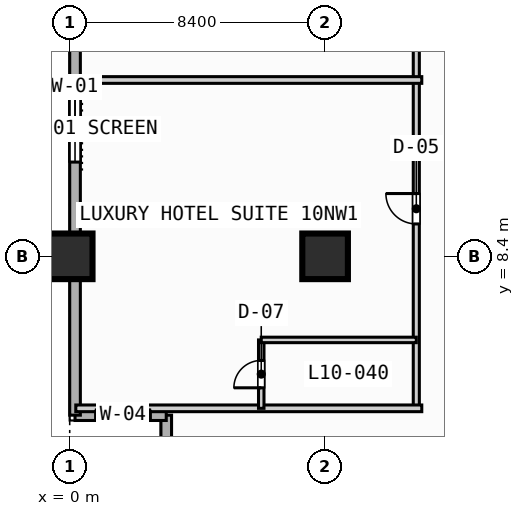
"""IFC4 building model, lengths in metres.
Left out: names, types, materials, properties, quantities, classifications, styles, units other than length and angle.
Written with IfcOpenShell. Run it as: python <this file> out.ifc"""

import sys

from ifc_helpers import new_model, si_unit, direction, frame, frame_2d, origin, origin_2d, place, context, subcontext, project, spatial, rectangle, extrude, element, fill, save


model = new_model("IFC4")
c1 = context("Model", 3, precision=1e-05, world=origin(), true_north=direction((0.0, 1.0)))
c2 = subcontext(c1, "Body", "Model", "MODEL_VIEW")
j1 = project(units=[si_unit("LENGTHUNIT", "METRE"), si_unit("PLANEANGLEUNIT", "RADIAN")], contexts=[c1])
p1 = place(None, origin())
s1 = spatial("IfcSite", under=j1, at=p1, CompositionType="ELEMENT")
p2 = place(p1, origin())
s2 = spatial("IfcBuilding", under=s1, at=p2, CompositionType="ELEMENT")
p3 = place(p2, frame((0.0, 0.0, 47.2)))
s3 = spatial("IfcBuildingStorey", under=s2, at=p3, CompositionType="ELEMENT", Elevation=47.2)
for number, where, z_axis, x_axis in (
    (1, (0.0, 8.4, 0.0), (0.0, 0.0, 1.0), (1.0, 0.0, 0.0)),
    (2, (8.4, 8.4, 0.0), (0.0, 0.0, 1.0), (1.0, 0.0, 0.0)),
):
    element("IfcColumn", number, at=place(p3, frame(where, z_axis=z_axis, x_axis=x_axis)), inside=s3, PredefinedType="COLUMN", context=c2, shape_type="SweptSolid", body=[
        extrude(rectangle(XDim=1.5, YDim=1.5, at=origin_2d()), origin(), (0.0, 0.0, 1.0), 3.8),
    ])
p4 = place(p3, frame((3.175, 0.175, 0.0), z_axis=(0.0, 0.0, 1.0), x_axis=(0.0, 1.0, 0.0)))
e3 = element("IfcWall", 3, at=p4, inside=s3, PredefinedType="STANDARD", context=c2, shape_type="SweptSolid", body=[
    extrude(rectangle(XDim=3.0, YDim=0.35, at=frame_2d((1.5, 0.0))), origin(), (0.0, 0.0, 1.0), 3.55),
])
p5 = place(p3, frame((3.175, 3.175, 0.0), z_axis=(0.0, 0.0, 1.0), x_axis=(-1.0, 0.0, 0.0)))
e4 = element("IfcWall", 4, at=p5, inside=s3, PredefinedType="STANDARD", context=c2, shape_type="SweptSolid", body=[
    extrude(rectangle(XDim=3.0, YDim=0.35, at=frame_2d((1.5, 0.0))), origin(), (0.0, 0.0, 1.0), 3.55),
])
p6 = place(p5, frame((0.522, 0.0, 0.85)))
e5 = element("IfcOpeningElement", 5, at=p6, cuts=e4, PredefinedType="OPENING", context=c2, shape_type="SweptSolid", body=[
    extrude(rectangle(XDim=1.8, YDim=1.8, at=frame_2d((0.9, 0.9))), frame((0.0, 0.185, 0.0), z_axis=(0.0, -1.0, 0.0), x_axis=(1.0, 0.0, 0.0)), (0.0, 0.0, 1.0), 0.37),
])
p7 = place(p3, frame((0.175, 3.175, 0.0), z_axis=(0.0, 0.0, 1.0), x_axis=(0.0, 1.0, 0.0)))
e6 = element("IfcWall", 6, at=p7, inside=s3, PredefinedType="STANDARD", context=c2, shape_type="SweptSolid", body=[
    extrude(rectangle(XDim=86.05, YDim=0.35, at=frame_2d((43.025, 0.0))), origin(), (0.0, 0.0, 1.0), 3.55),
])
p8 = place(p7, frame((42.325, 0.0, 0.0)))
e7 = element("IfcOpeningElement", 7, at=p8, cuts=e6, PredefinedType="OPENING", context=c2, shape_type="SweptSolid", body=[
    extrude(rectangle(XDim=1.4, YDim=2.2, at=frame_2d((0.7, 1.1))), frame((0.0, 0.185, 0.0), z_axis=(0.0, -1.0, 0.0), x_axis=(1.0, 0.0, 0.0)), (0.0, 0.0, 1.0), 0.37),
])
p9 = place(p7, frame((8.325, 0.0, 0.85)))
e8 = element("IfcOpeningElement", 8, at=p9, cuts=e6, PredefinedType="OPENING", context=c2, shape_type="SweptSolid", body=[
    extrude(rectangle(XDim=2.2, YDim=1.8, at=frame_2d((1.1, 0.9))), frame((0.0, 0.185, 0.0), z_axis=(0.0, -1.0, 0.0), x_axis=(1.0, 0.0, 0.0)), (0.0, 0.0, 1.0), 0.37),
])
p10 = place(p7, frame((16.725, 0.0, 0.85)))
e9 = element("IfcOpeningElement", 9, at=p10, cuts=e6, PredefinedType="OPENING", context=c2, shape_type="SweptSolid", body=[
    extrude(rectangle(XDim=2.2, YDim=1.8, at=frame_2d((1.1, 0.9))), frame((0.0, 0.185, 0.0), z_axis=(0.0, -1.0, 0.0), x_axis=(1.0, 0.0, 0.0)), (0.0, 0.0, 1.0), 0.37),
])
p11 = place(p7, frame((25.125, 0.0, 0.85)))
e10 = element("IfcOpeningElement", 10, at=p11, cuts=e6, PredefinedType="OPENING", context=c2, shape_type="SweptSolid", body=[
    extrude(rectangle(XDim=2.2, YDim=1.8, at=frame_2d((1.1, 0.9))), frame((0.0, 0.185, 0.0), z_axis=(0.0, -1.0, 0.0), x_axis=(1.0, 0.0, 0.0)), (0.0, 0.0, 1.0), 0.37),
])
p12 = place(p7, frame((33.525, 0.0, 0.85)))
e11 = element("IfcOpeningElement", 11, at=p12, cuts=e6, PredefinedType="OPENING", context=c2, shape_type="SweptSolid", body=[
    extrude(rectangle(XDim=2.2, YDim=1.8, at=frame_2d((1.1, 0.9))), frame((0.0, 0.185, 0.0), z_axis=(0.0, -1.0, 0.0), x_axis=(1.0, 0.0, 0.0)), (0.0, 0.0, 1.0), 0.37),
])
p13 = place(p7, frame((56.675, 0.0, 0.85)))
e12 = element("IfcOpeningElement", 12, at=p13, cuts=e6, PredefinedType="OPENING", context=c2, shape_type="SweptSolid", body=[
    extrude(rectangle(XDim=1.8, YDim=1.8, at=frame_2d((0.9, 0.9))), frame((0.0, 0.185, 0.0), z_axis=(0.0, -1.0, 0.0), x_axis=(1.0, 0.0, 0.0)), (0.0, 0.0, 1.0), 0.37),
])
p14 = place(p3, frame((11.4, 3.4, 0.0), z_axis=(0.0, 0.0, 1.0), x_axis=(0.0, 1.0, 0.0)))
e13 = element("IfcWall", 13, at=p14, inside=s3, PredefinedType="PARTITIONING", context=c2, shape_type="SweptSolid", body=[
    extrude(rectangle(XDim=60.4, YDim=0.2, at=frame_2d((30.2, 0.0))), origin(), (0.0, 0.0, 1.0), 3.55),
])
p15 = place(p14, frame((6.065, 0.0, 0.0)))
e14 = element("IfcOpeningElement", 14, at=p15, cuts=e13, PredefinedType="OPENING", context=c2, shape_type="SweptSolid", body=[
    extrude(rectangle(XDim=1.0, YDim=2.15, at=frame_2d((0.5, 1.075))), frame((0.0, 0.11, 0.0), z_axis=(0.0, -1.0, 0.0), x_axis=(1.0, 0.0, 0.0)), (0.0, 0.0, 1.0), 0.22),
])
p16 = place(p14, frame((13.735, 0.0, 0.0)))
e15 = element("IfcOpeningElement", 15, at=p16, cuts=e13, PredefinedType="OPENING", context=c2, shape_type="SweptSolid", body=[
    extrude(rectangle(XDim=1.0, YDim=2.15, at=frame_2d((0.5, 1.075))), frame((0.0, 0.11, 0.0), z_axis=(0.0, -1.0, 0.0), x_axis=(1.0, 0.0, 0.0)), (0.0, 0.0, 1.0), 0.22),
])
p17 = place(p14, frame((22.96, 0.0, 0.0)))
e16 = element("IfcOpeningElement", 16, at=p17, cuts=e13, PredefinedType="OPENING", context=c2, shape_type="SweptSolid", body=[
    extrude(rectangle(XDim=1.0, YDim=2.15, at=frame_2d((0.5, 1.075))), frame((0.0, 0.11, 0.0), z_axis=(0.0, -1.0, 0.0), x_axis=(1.0, 0.0, 0.0)), (0.0, 0.0, 1.0), 0.22),
])
p18 = place(p14, frame((31.785, 0.0, 0.0)))
e17 = element("IfcOpeningElement", 17, at=p18, cuts=e13, PredefinedType="OPENING", context=c2, shape_type="SweptSolid", body=[
    extrude(rectangle(XDim=1.0, YDim=2.15, at=frame_2d((0.5, 1.075))), frame((0.0, 0.11, 0.0), z_axis=(0.0, -1.0, 0.0), x_axis=(1.0, 0.0, 0.0)), (0.0, 0.0, 1.0), 0.22),
])
p19 = place(p14, frame((42.56, 0.0, 0.0)))
e18 = element("IfcOpeningElement", 18, at=p19, cuts=e13, PredefinedType="OPENING", context=c2, shape_type="SweptSolid", body=[
    extrude(rectangle(XDim=1.0, YDim=2.15, at=frame_2d((0.5, 1.075))), frame((0.0, 0.11, 0.0), z_axis=(0.0, -1.0, 0.0), x_axis=(1.0, 0.0, 0.0)), (0.0, 0.0, 1.0), 0.22),
])
p20 = place(p14, frame((53.935, 0.0, 0.0)))
e19 = element("IfcOpeningElement", 19, at=p20, cuts=e13, PredefinedType="OPENING", context=c2, shape_type="SweptSolid", body=[
    extrude(rectangle(XDim=1.0, YDim=2.15, at=frame_2d((0.5, 1.075))), frame((0.0, 0.11, 0.0), z_axis=(0.0, -1.0, 0.0), x_axis=(1.0, 0.0, 0.0)), (0.0, 0.0, 1.0), 0.22),
])
p21 = place(p3, frame((0.2, 3.4, 0.0), z_axis=(0.0, 0.0, 1.0), x_axis=(1.0, 0.0, 0.0)))
e20 = element("IfcWall", 20, at=p21, inside=s3, PredefinedType="PARTITIONING", context=c2, shape_type="SweptSolid", body=[
    extrude(rectangle(XDim=11.38, YDim=0.22, at=frame_2d((5.69, 0.0))), origin(), (0.0, 0.0, 1.0), 3.55),
])
p22 = place(p3, frame((6.3, 3.4, 0.0), z_axis=(0.0, 0.0, 1.0), x_axis=(0.0, 1.0, 0.0)))
e21 = element("IfcWall", 21, at=p22, inside=s3, PredefinedType="PLUMBINGWALL", context=c2, shape_type="SweptSolid", body=[
    extrude(rectangle(XDim=2.25, YDim=0.18, at=frame_2d((1.125, 0.0))), origin(), (0.0, 0.0, 1.0), 3.55),
])
p23 = place(p22, frame((0.675, 0.0, 0.0)))
e22 = element("IfcOpeningElement", 22, at=p23, cuts=e21, PredefinedType="OPENING", context=c2, shape_type="SweptSolid", body=[
    extrude(rectangle(XDim=0.9, YDim=2.1, at=frame_2d((0.45, 1.05))), frame((0.0, 0.1, 0.0), z_axis=(0.0, -1.0, 0.0), x_axis=(1.0, 0.0, 0.0)), (0.0, 0.0, 1.0), 0.2),
])
p24 = place(p3, frame((6.3, 5.65, 0.0), z_axis=(0.0, 0.0, 1.0), x_axis=(1.0, 0.0, 0.0)))
e23 = element("IfcWall", 23, at=p24, inside=s3, PredefinedType="PLUMBINGWALL", context=c2, shape_type="SweptSolid", body=[
    extrude(rectangle(XDim=5.1, YDim=0.18, at=frame_2d((2.55, 0.0))), origin(), (0.0, 0.0, 1.0), 3.55),
])
p25 = place(p3, frame((0.2, 14.2, 0.0), z_axis=(0.0, 0.0, 1.0), x_axis=(1.0, 0.0, 0.0)))
e24 = element("IfcWall", 24, at=p25, inside=s3, PredefinedType="PARTITIONING", context=c2, shape_type="SweptSolid", body=[
    extrude(rectangle(XDim=11.38, YDim=0.22, at=frame_2d((5.69, 0.0))), origin(), (0.0, 0.0, 1.0), 3.55),
])
p26 = place(p6, origin())
e25 = element("IfcWindow", 25, at=p26, inside=s3, PartitioningType="SINGLE_PANEL", PredefinedType="WINDOW", context=c2, shape_type="SweptSolid", body=[
    extrude(rectangle(XDim=1.8, YDim=1.8, at=frame_2d((0.9, 0.9))), frame((0.0, 0.03, 0.0), z_axis=(0.0, -1.0, 0.0), x_axis=(1.0, 0.0, 0.0)), (0.0, 0.0, 1.0), 0.06),
])
fill(e5, e25)
p27 = place(p9, origin())
e26 = element("IfcWindow", 26, at=p27, inside=s3, PartitioningType="SINGLE_PANEL", PredefinedType="WINDOW", context=c2, shape_type="SweptSolid", body=[
    extrude(rectangle(XDim=2.2, YDim=1.8, at=frame_2d((1.1, 0.9))), frame((0.0, 0.03, 0.0), z_axis=(0.0, -1.0, 0.0), x_axis=(1.0, 0.0, 0.0)), (0.0, 0.0, 1.0), 0.06),
])
fill(e8, e26)
p28 = place(p15, origin())
e27 = element("IfcDoor", 27, at=p28, inside=s3, OperationType="SINGLE_SWING_RIGHT", PredefinedType="DOOR", context=c2, shape_type="SweptSolid", body=[
    extrude(rectangle(XDim=1.0, YDim=2.15, at=frame_2d((0.5, 1.075))), frame((0.0, 0.025, 0.0), z_axis=(0.0, -1.0, 0.0), x_axis=(1.0, 0.0, 0.0)), (0.0, 0.0, 1.0), 0.05),
])
fill(e14, e27)
p29 = place(p23, origin())
e28 = element("IfcDoor", 28, at=p29, inside=s3, OperationType="SINGLE_SWING_LEFT", PredefinedType="DOOR", context=c2, shape_type="SweptSolid", body=[
    extrude(rectangle(XDim=0.9, YDim=2.1, at=frame_2d((0.45, 1.05))), frame((0.0, 0.025, 0.0), z_axis=(0.0, -1.0, 0.0), x_axis=(1.0, 0.0, 0.0)), (0.0, 0.0, 1.0), 0.05),
])
fill(e22, e28)
save(model, sys.argv[1])
